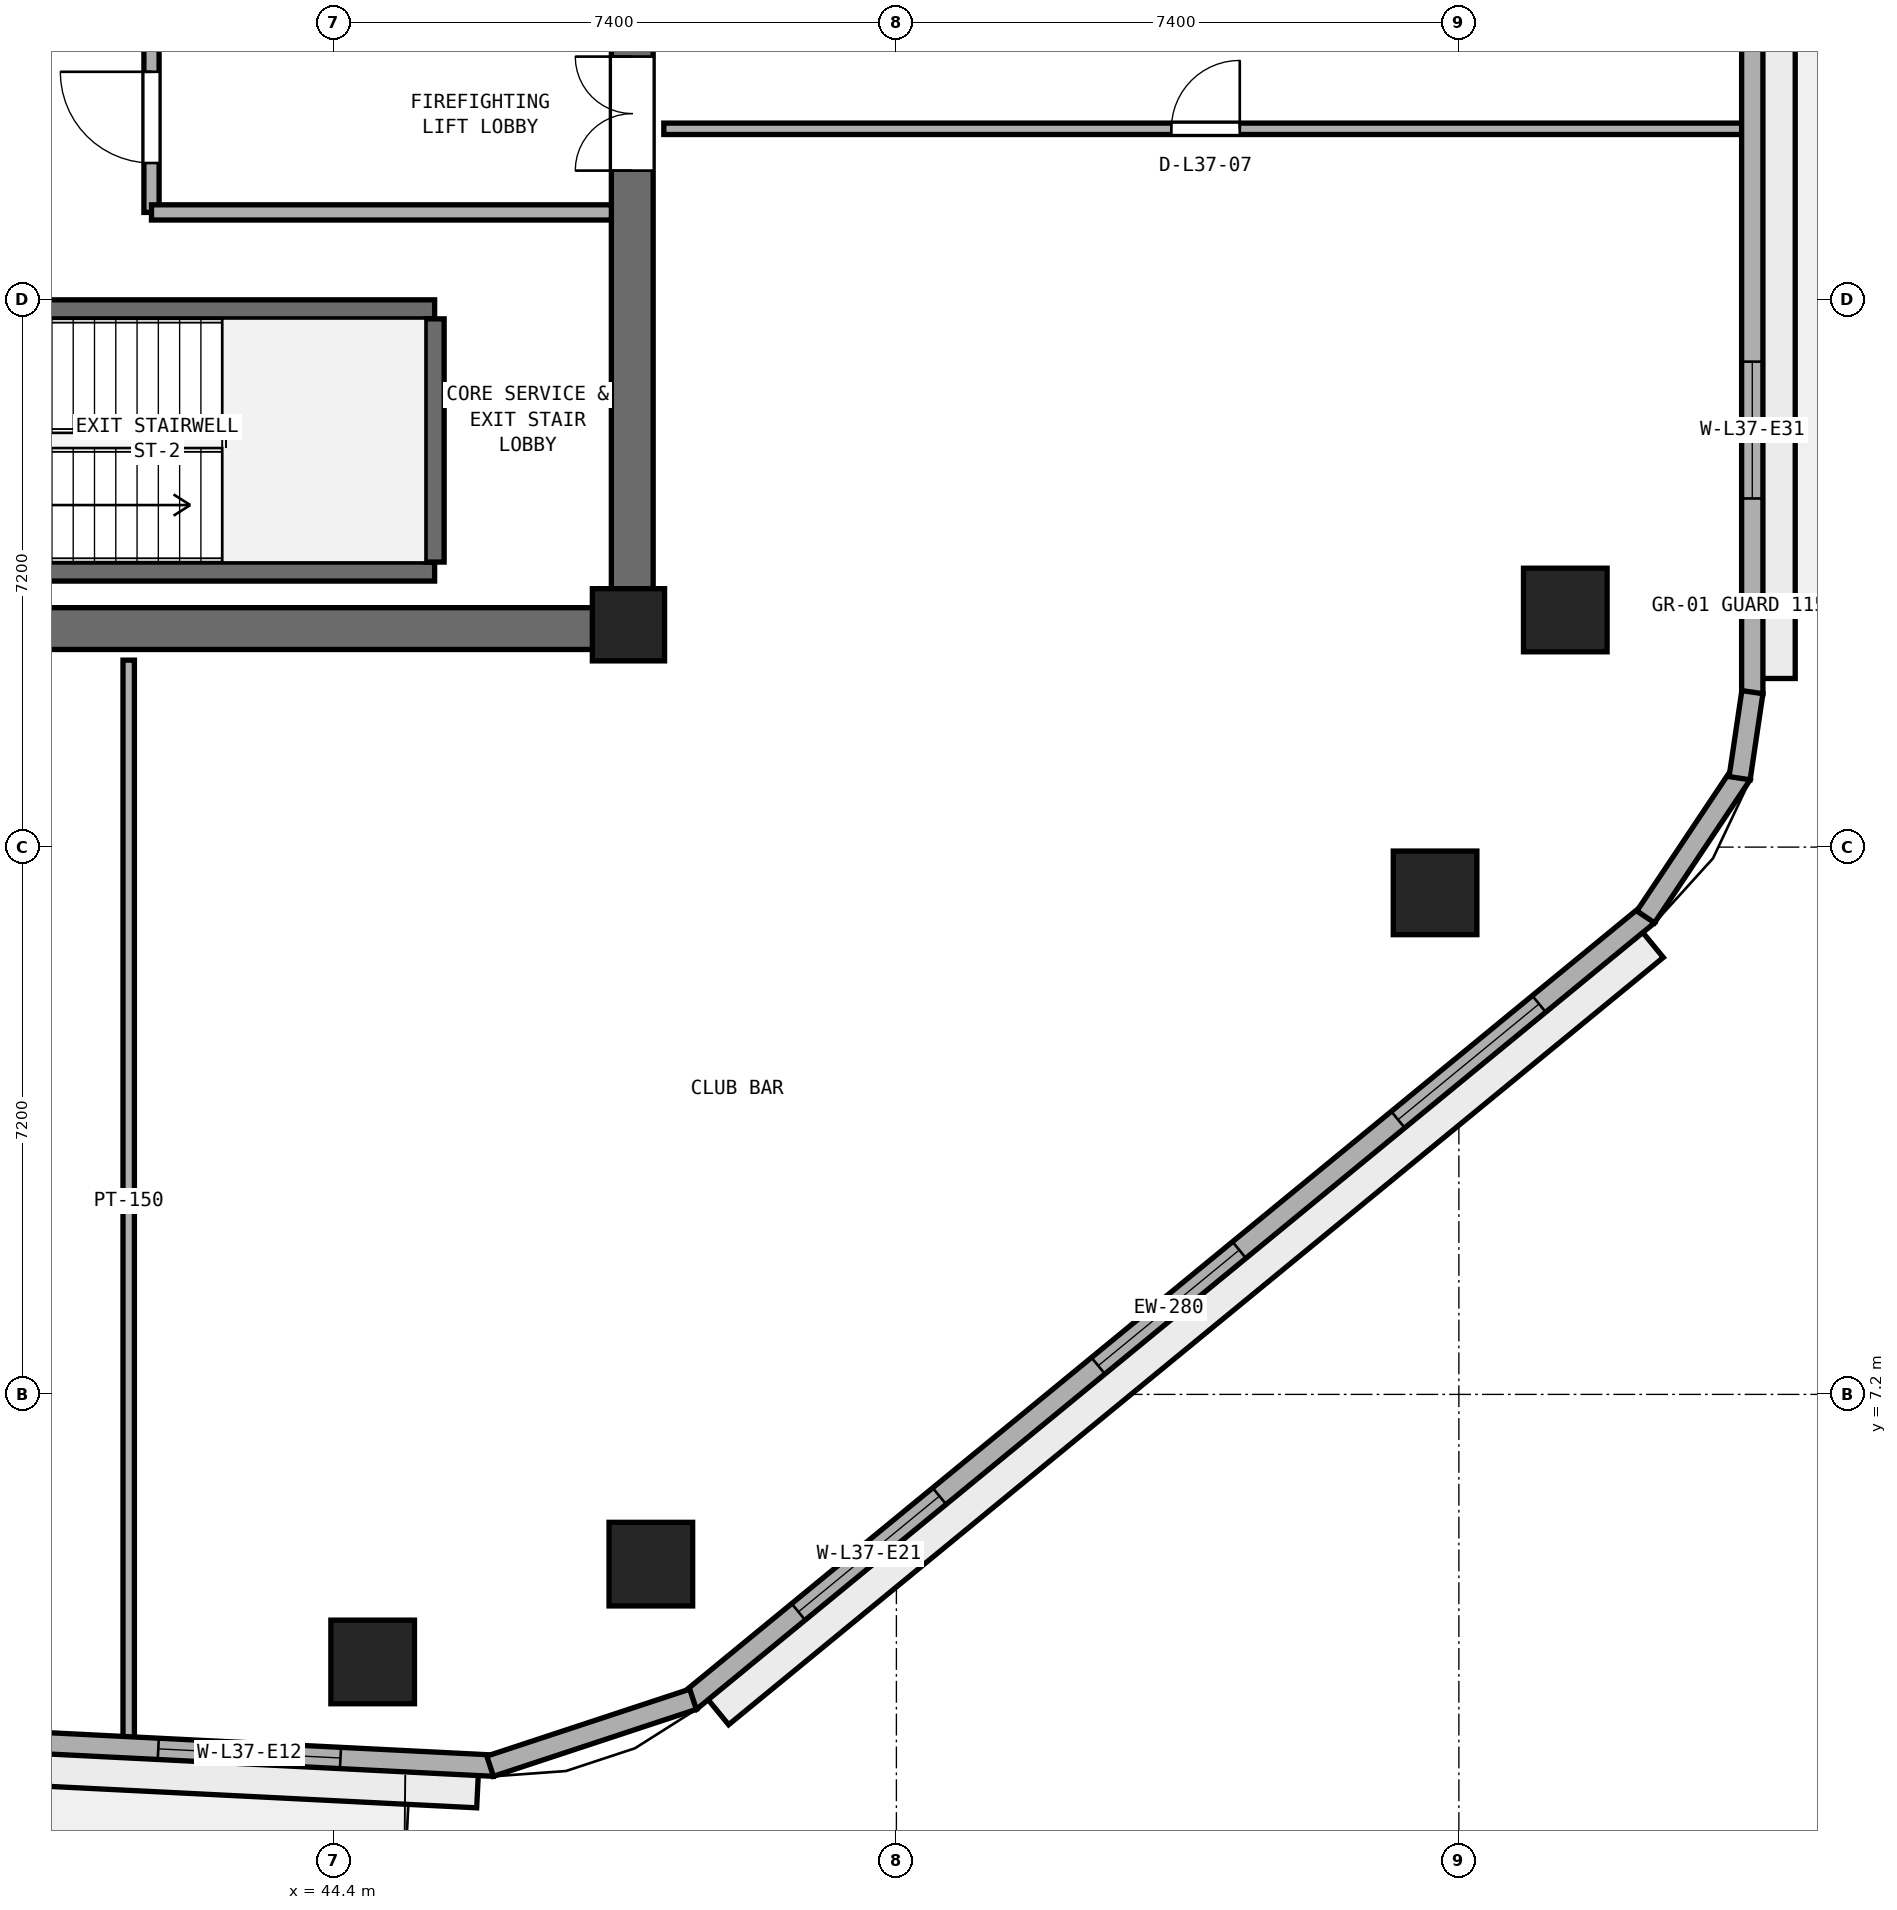
"""IFC4 building model, lengths in metres.
Left out: names, types, materials, properties, quantities, classifications, styles, units other than length and angle.
Written with IfcOpenShell. Run it as: python <this file> out.ifc"""

import sys

from ifc_helpers import new_model, si_unit, direction, frame, frame_2d, origin, origin_2d, place, context, subcontext, project, spatial, rectangle, extrude, element, fill, save


model = new_model("IFC4")
c1 = context("Model", 3, precision=1e-05, world=origin(), true_north=direction((0.0, 1.0)))
c2 = subcontext(c1, "Body", "Model", "MODEL_VIEW")
j1 = project(units=[si_unit("LENGTHUNIT", "METRE"), si_unit("PLANEANGLEUNIT", "RADIAN")], contexts=[c1])
p1 = place(None, origin())
s1 = spatial("IfcSite", under=j1, at=p1, CompositionType="ELEMENT")
p2 = place(p1, origin())
s2 = spatial("IfcBuilding", under=s1, at=p2, CompositionType="ELEMENT")
p3 = place(p2, frame((0.0, 0.0, 147.8)))
s3 = spatial("IfcBuildingStorey", under=s2, at=p3, CompositionType="ELEMENT", Elevation=147.8)
p4 = place(p3, frame((25.4, 17.275, 0.0), z_axis=(0.0, 0.0, 1.0), x_axis=(1.0, 0.0, 0.0)))
e1 = element("IfcWall", 1, at=p4, inside=s3, PredefinedType="SHEAR", context=c2, shape_type="SweptSolid", body=[
    extrude(rectangle(XDim=23.2, YDim=0.55, at=frame_2d((11.6, 0.0))), origin(), (0.0, 0.0, 1.0), 3.54),
])
p5 = place(p3, frame((48.325, 17.55, 0.0), z_axis=(0.0, 0.0, 1.0), x_axis=(0.0, 1.0, 0.0)))
e2 = element("IfcWall", 2, at=p5, inside=s3, PredefinedType="SHEAR", context=c2, shape_type="SweptSolid", body=[
    extrude(rectangle(XDim=15.3, YDim=0.55, at=frame_2d((7.65, 0.0))), origin(), (0.0, 0.0, 1.0), 3.54),
])
p6 = place(p5, frame((5.75, 0.0, 0.0)))
e3 = element("IfcOpeningElement", 3, at=p6, cuts=e2, PredefinedType="OPENING", context=c2, shape_type="SweptSolid", body=[
    extrude(rectangle(XDim=1.5, YDim=2.15, at=frame_2d((0.75, 1.075))), frame((0.0, 0.285, 0.0), z_axis=(0.0, -1.0, 0.0), x_axis=(1.0, 0.0, 0.0)), (0.0, 0.0, 1.0), 0.57),
])
p7 = place(p3, frame((48.275, 17.325, 0.0), z_axis=(0.0, 0.0, 1.0), x_axis=(1.0, 0.0, 0.0)))
e4 = element("IfcColumn", 4, at=p7, inside=s3, PredefinedType="PILASTER", context=c2, shape_type="SweptSolid", body=[
    extrude(rectangle(XDim=0.95, YDim=0.95, at=origin_2d()), origin(), (0.0, 0.0, 1.0), 3.8),
])
for number, where, z_axis, x_axis in (
    (5, (44.91, 3.68, 0.0), (0.0, 0.0, 1.0), (1.0, 0.0, 0.0)),
    (6, (48.57, 4.967, 0.0), (0.0, 0.0, 1.0), (1.0, 0.0, 0.0)),
    (7, (58.887, 13.798, 0.0), (0.0, 0.0, 1.0), (1.0, 0.0, 0.0)),
    (8, (60.6, 17.519, 0.0), (0.0, 0.0, 1.0), (1.0, 0.0, 0.0)),
):
    element("IfcColumn", number, at=place(p3, frame(where, z_axis=z_axis, x_axis=x_axis)), inside=s3, PredefinedType="COLUMN", context=c2, shape_type="SweptSolid", body=[
        extrude(rectangle(XDim=1.1, YDim=1.1, at=origin_2d()), origin(), (0.0, 0.0, 1.0), 3.8),
    ])
for number, where, z_axis, x_axis in (
    (9, (38.425, 18.025, 0.0), (0.0, 0.0, 1.0), (1.0, 0.0, 0.0)),
    (10, (38.425, 21.475, 0.0), (0.0, 0.0, 1.0), (1.0, 0.0, 0.0)),
):
    element("IfcWall", number, at=place(p3, frame(where, z_axis=z_axis, x_axis=x_axis)), inside=s3, PredefinedType="SHEAR", context=c2, shape_type="SweptSolid", body=[
        extrude(rectangle(XDim=7.3, YDim=0.25, at=frame_2d((3.65, 0.0))), origin(), (0.0, 0.0, 1.0), 3.54),
    ])
p8 = place(p3, frame((45.725, 18.15, 0.0), z_axis=(0.0, 0.0, 1.0), x_axis=(0.0, 1.0, 0.0)))
e11 = element("IfcWall", 11, at=p8, inside=s3, PredefinedType="SHEAR", context=c2, shape_type="SweptSolid", body=[
    extrude(rectangle(XDim=3.2, YDim=0.25, at=frame_2d((1.6, 0.0))), origin(), (0.0, 0.0, 1.0), 3.54),
])
p9 = place(p3, frame((42.0, 22.75, 0.0), z_axis=(0.0, 0.0, 1.0), x_axis=(0.0, 1.0, 0.0)))
e12 = element("IfcWall", 12, at=p9, inside=s3, PredefinedType="SOLIDWALL", context=c2, shape_type="SweptSolid", body=[
    extrude(rectangle(XDim=6.05, YDim=0.2, at=frame_2d((3.025, 0.0))), origin(), (0.0, 0.0, 1.0), 3.54),
])
p10 = place(p9, frame((0.65, 0.0, 0.0)))
e13 = element("IfcOpeningElement", 13, at=p10, cuts=e12, PredefinedType="OPENING", context=c2, shape_type="SweptSolid", body=[
    extrude(rectangle(XDim=1.2, YDim=2.15, at=frame_2d((0.6, 1.075))), frame((0.0, 0.11, 0.0), z_axis=(0.0, -1.0, 0.0), x_axis=(1.0, 0.0, 0.0)), (0.0, 0.0, 1.0), 0.22),
])
p11 = place(p3, frame((42.0, 22.75, 0.0), z_axis=(0.0, 0.0, 1.0), x_axis=(1.0, 0.0, 0.0)))
e14 = element("IfcWall", 14, at=p11, inside=s3, PredefinedType="SOLIDWALL", context=c2, shape_type="SweptSolid", body=[
    extrude(rectangle(XDim=6.05, YDim=0.2, at=frame_2d((3.025, 0.0))), origin(), (0.0, 0.0, 1.0), 3.54),
])
p12 = place(p3, frame((41.7, 2.621, 0.0), z_axis=(0.0, 0.0, 1.0), x_axis=(0.0, 1.0, 0.0)))
e15 = element("IfcWall", 15, at=p12, inside=s3, PredefinedType="PARTITIONING", context=c2, shape_type="SweptSolid", body=[
    extrude(rectangle(XDim=14.239, YDim=0.15, at=frame_2d((7.119, 0.0))), origin(), (0.0, 0.0, 1.0), 3.54),
])
p13 = place(p3, frame((48.74, 23.85, 0.0), z_axis=(0.0, 0.0, 1.0), x_axis=(1.0, 0.0, 0.0)))
e16 = element("IfcWall", 16, at=p13, inside=s3, PredefinedType="PARTITIONING", context=c2, shape_type="SweptSolid", body=[
    extrude(rectangle(XDim=14.255, YDim=0.15, at=frame_2d((7.127, 0.0))), origin(), (0.0, 0.0, 1.0), 3.54),
])
p14 = place(p13, frame((6.677, 0.0, 0.0)))
e17 = element("IfcOpeningElement", 17, at=p14, cuts=e16, PredefinedType="OPENING", context=c2, shape_type="SweptSolid", body=[
    extrude(rectangle(XDim=0.9, YDim=2.1, at=frame_2d((0.45, 1.05))), frame((0.0, 0.085, 0.0), z_axis=(0.0, -1.0, 0.0), x_axis=(1.0, 0.0, 0.0)), (0.0, 0.0, 1.0), 0.17),
])
p15 = place(p3, frame((29.195, 3.184, 0.0), z_axis=(0.0, 0.0, 1.0), x_axis=(0.998743400978, -0.05011605535, 0.0)))
e18 = element("IfcWall", 18, at=p15, inside=s3, PredefinedType="STANDARD", context=c2, shape_type="SweptSolid", body=[
    extrude(rectangle(XDim=17.333, YDim=0.28, at=frame_2d((8.667, 0.0))), origin(), (0.0, 0.0, 1.0), 3.54),
])
p16 = place(p15, frame((8.116, 0.0, 0.0)))
e19 = element("IfcOpeningElement", 19, at=p16, cuts=e18, PredefinedType="OPENING", context=c2, shape_type="SweptSolid", body=[
    extrude(rectangle(XDim=1.1, YDim=2.2, at=frame_2d((0.55, 1.1))), frame((0.0, 0.15, 0.0), z_axis=(0.0, -1.0, 0.0), x_axis=(1.0, 0.0, 0.0)), (0.0, 0.0, 1.0), 0.3),
])
p17 = place(p15, frame((2.022, 0.0, 0.9)))
e20 = element("IfcOpeningElement", 20, at=p17, cuts=e18, PredefinedType="OPENING", context=c2, shape_type="SweptSolid", body=[
    extrude(rectangle(XDim=2.4, YDim=1.75, at=frame_2d((1.2, 0.875))), frame((0.0, 0.15, 0.0), z_axis=(0.0, -1.0, 0.0), x_axis=(1.0, 0.0, 0.0)), (0.0, 0.0, 1.0), 0.3),
])
p18 = place(p15, frame((12.911, 0.0, 0.9)))
e21 = element("IfcOpeningElement", 21, at=p18, cuts=e18, PredefinedType="OPENING", context=c2, shape_type="SweptSolid", body=[
    extrude(rectangle(XDim=2.4, YDim=1.75, at=frame_2d((1.2, 0.875))), frame((0.0, 0.15, 0.0), z_axis=(0.0, -1.0, 0.0), x_axis=(1.0, 0.0, 0.0)), (0.0, 0.0, 1.0), 0.3),
])
p19 = place(p3, frame((49.08, 3.164, 0.0), z_axis=(0.0, 0.0, 1.0), x_axis=(0.772937830186, 0.634481765433, 0.0)))
e22 = element("IfcWall", 22, at=p19, inside=s3, PredefinedType="STANDARD", context=c2, shape_type="SweptSolid", body=[
    extrude(rectangle(XDim=16.309, YDim=0.28, at=frame_2d((8.154, 0.0))), origin(), (0.0, 0.0, 1.0), 3.54),
])
p20 = place(p19, frame((1.852, 0.0, 0.9)))
e23 = element("IfcOpeningElement", 23, at=p20, cuts=e22, PredefinedType="OPENING", context=c2, shape_type="SweptSolid", body=[
    extrude(rectangle(XDim=2.4, YDim=1.75, at=frame_2d((1.2, 0.875))), frame((0.0, 0.15, 0.0), z_axis=(0.0, -1.0, 0.0), x_axis=(1.0, 0.0, 0.0)), (0.0, 0.0, 1.0), 0.3),
])
p21 = place(p19, frame((6.954, 0.0, 0.9)))
e24 = element("IfcOpeningElement", 24, at=p21, cuts=e22, PredefinedType="OPENING", context=c2, shape_type="SweptSolid", body=[
    extrude(rectangle(XDim=2.4, YDim=1.75, at=frame_2d((1.2, 0.875))), frame((0.0, 0.15, 0.0), z_axis=(0.0, -1.0, 0.0), x_axis=(1.0, 0.0, 0.0)), (0.0, 0.0, 1.0), 0.3),
])
p22 = place(p19, frame((12.057, 0.0, 0.9)))
e25 = element("IfcOpeningElement", 25, at=p22, cuts=e22, PredefinedType="OPENING", context=c2, shape_type="SweptSolid", body=[
    extrude(rectangle(XDim=2.4, YDim=1.75, at=frame_2d((1.2, 0.875))), frame((0.0, 0.15, 0.0), z_axis=(0.0, -1.0, 0.0), x_axis=(1.0, 0.0, 0.0)), (0.0, 0.0, 1.0), 0.3),
])
p23 = place(p3, frame((63.06, 16.418, 0.0), z_axis=(0.0, 0.0, 1.0), x_axis=(0.0, 1.0, 0.0)))
e26 = element("IfcWall", 26, at=p23, inside=s3, PredefinedType="STANDARD", context=c2, shape_type="SweptSolid", body=[
    extrude(rectangle(XDim=18.812, YDim=0.28, at=frame_2d((9.406, 0.0))), origin(), (0.0, 0.0, 1.0), 2.79),
])
p24 = place(p23, frame((8.556, 0.0, 0.0)))
e27 = element("IfcOpeningElement", 27, at=p24, cuts=e26, PredefinedType="OPENING", context=c2, shape_type="SweptSolid", body=[
    extrude(rectangle(XDim=1.1, YDim=2.2, at=frame_2d((0.55, 1.1))), frame((0.0, 0.15, 0.0), z_axis=(0.0, -1.0, 0.0), x_axis=(1.0, 0.0, 0.0)), (0.0, 0.0, 1.0), 0.3),
])
p25 = place(p23, frame((2.569, 0.0, 0.85)))
e28 = element("IfcOpeningElement", 28, at=p25, cuts=e26, PredefinedType="OPENING", context=c2, shape_type="SweptSolid", body=[
    extrude(rectangle(XDim=1.8, YDim=1.2, at=frame_2d((0.9, 0.6))), frame((0.0, 0.15, 0.0), z_axis=(0.0, -1.0, 0.0), x_axis=(1.0, 0.0, 0.0)), (0.0, 0.0, 1.0), 0.3),
])
p26 = place(p23, frame((14.693, 0.0, 0.85)))
e29 = element("IfcOpeningElement", 29, at=p26, cuts=e26, PredefinedType="OPENING", context=c2, shape_type="SweptSolid", body=[
    extrude(rectangle(XDim=1.8, YDim=1.2, at=frame_2d((0.9, 0.6))), frame((0.0, 0.15, 0.0), z_axis=(0.0, -1.0, 0.0), x_axis=(1.0, 0.0, 0.0)), (0.0, 0.0, 1.0), 0.3),
])
p27 = place(p3, frame((46.455, 2.309, 0.0), z_axis=(0.0, 0.0, 1.0), x_axis=(0.949677222099, 0.313230224955, 0.0)))
e30 = element("IfcWall", 30, at=p27, inside=s3, PredefinedType="STANDARD", context=c2, shape_type="SweptSolid", body=[
    extrude(rectangle(XDim=2.811, YDim=0.28, at=frame_2d((1.406, 0.0))), origin(), (0.0, 0.0, 1.0), 3.54),
])
p28 = place(p3, frame((61.658, 13.482, 0.0), z_axis=(0.0, 0.0, 1.0), x_axis=(0.555521224344, 0.831502356764, 0.0)))
e31 = element("IfcWall", 31, at=p28, inside=s3, PredefinedType="STANDARD", context=c2, shape_type="SweptSolid", body=[
    extrude(rectangle(XDim=2.264, YDim=0.28, at=frame_2d((1.132, 0.0))), origin(), (0.0, 0.0, 1.0), 3.54),
])
p29 = place(p3, frame((62.894, 15.307, 0.0), z_axis=(0.0, 0.0, 1.0), x_axis=(0.146796104284, 0.989166772474, 0.0)))
e32 = element("IfcWall", 32, at=p29, inside=s3, PredefinedType="STANDARD", context=c2, shape_type="SweptSolid", body=[
    extrude(rectangle(XDim=1.144, YDim=0.28, at=frame_2d((0.572, 0.0))), origin(), (0.0, 0.0, 1.0), 3.54),
])
p30 = place(p10, origin())
e33 = element("IfcDoor", 33, at=p30, inside=s3, OperationType="SINGLE_SWING_RIGHT", PredefinedType="DOOR", context=c2, shape_type="SweptSolid", body=[
    extrude(rectangle(XDim=1.2, YDim=2.15, at=frame_2d((0.6, 1.075))), frame((0.0, 0.025, 0.0), z_axis=(0.0, -1.0, 0.0), x_axis=(1.0, 0.0, 0.0)), (0.0, 0.0, 1.0), 0.05),
])
fill(e13, e33)
p31 = place(p6, origin())
e34 = element("IfcDoor", 34, at=p31, inside=s3, OperationType="DOUBLE_DOOR_SINGLE_SWING", PredefinedType="DOOR", context=c2, shape_type="SweptSolid", body=[
    extrude(rectangle(XDim=1.5, YDim=2.15, at=frame_2d((0.75, 1.075))), frame((0.0, 0.025, 0.0), z_axis=(0.0, -1.0, 0.0), x_axis=(1.0, 0.0, 0.0)), (0.0, 0.0, 1.0), 0.05),
])
fill(e3, e34)
p32 = place(p14, origin())
e35 = element("IfcDoor", 35, at=p32, inside=s3, OperationType="SINGLE_SWING_RIGHT", PredefinedType="DOOR", context=c2, shape_type="SweptSolid", body=[
    extrude(rectangle(XDim=0.9, YDim=2.1, at=frame_2d((0.45, 1.05))), frame((0.0, 0.025, 0.0), z_axis=(0.0, -1.0, 0.0), x_axis=(1.0, 0.0, 0.0)), (0.0, 0.0, 1.0), 0.05),
])
fill(e17, e35)
p33 = place(p18, origin())
e36 = element("IfcWindow", 36, at=p33, inside=s3, PartitioningType="SINGLE_PANEL", PredefinedType="WINDOW", context=c2, shape_type="SweptSolid", body=[
    extrude(rectangle(XDim=2.4, YDim=1.75, at=frame_2d((1.2, 0.875))), frame((0.0, 0.03, 0.0), z_axis=(0.0, -1.0, 0.0), x_axis=(1.0, 0.0, 0.0)), (0.0, 0.0, 1.0), 0.06),
])
fill(e21, e36)
p34 = place(p20, origin())
e37 = element("IfcWindow", 37, at=p34, inside=s3, PartitioningType="SINGLE_PANEL", PredefinedType="WINDOW", context=c2, shape_type="SweptSolid", body=[
    extrude(rectangle(XDim=2.4, YDim=1.75, at=frame_2d((1.2, 0.875))), frame((0.0, 0.03, 0.0), z_axis=(0.0, -1.0, 0.0), x_axis=(1.0, 0.0, 0.0)), (0.0, 0.0, 1.0), 0.06),
])
fill(e23, e37)
p35 = place(p21, origin())
e38 = element("IfcWindow", 38, at=p35, inside=s3, PartitioningType="SINGLE_PANEL", PredefinedType="WINDOW", context=c2, shape_type="SweptSolid", body=[
    extrude(rectangle(XDim=2.4, YDim=1.75, at=frame_2d((1.2, 0.875))), frame((0.0, 0.03, 0.0), z_axis=(0.0, -1.0, 0.0), x_axis=(1.0, 0.0, 0.0)), (0.0, 0.0, 1.0), 0.06),
])
fill(e24, e38)
p36 = place(p22, origin())
e39 = element("IfcWindow", 39, at=p36, inside=s3, PartitioningType="SINGLE_PANEL", PredefinedType="WINDOW", context=c2, shape_type="SweptSolid", body=[
    extrude(rectangle(XDim=2.4, YDim=1.75, at=frame_2d((1.2, 0.875))), frame((0.0, 0.03, 0.0), z_axis=(0.0, -1.0, 0.0), x_axis=(1.0, 0.0, 0.0)), (0.0, 0.0, 1.0), 0.06),
])
fill(e25, e39)
p37 = place(p25, origin())
e40 = element("IfcWindow", 40, at=p37, inside=s3, PartitioningType="SINGLE_PANEL", PredefinedType="WINDOW", context=c2, shape_type="SweptSolid", body=[
    extrude(rectangle(XDim=1.8, YDim=1.2, at=frame_2d((0.9, 0.6))), frame((0.0, 0.03, 0.0), z_axis=(0.0, -1.0, 0.0), x_axis=(1.0, 0.0, 0.0)), (0.0, 0.0, 1.0), 0.06),
])
fill(e28, e40)
save(model, sys.argv[1])
